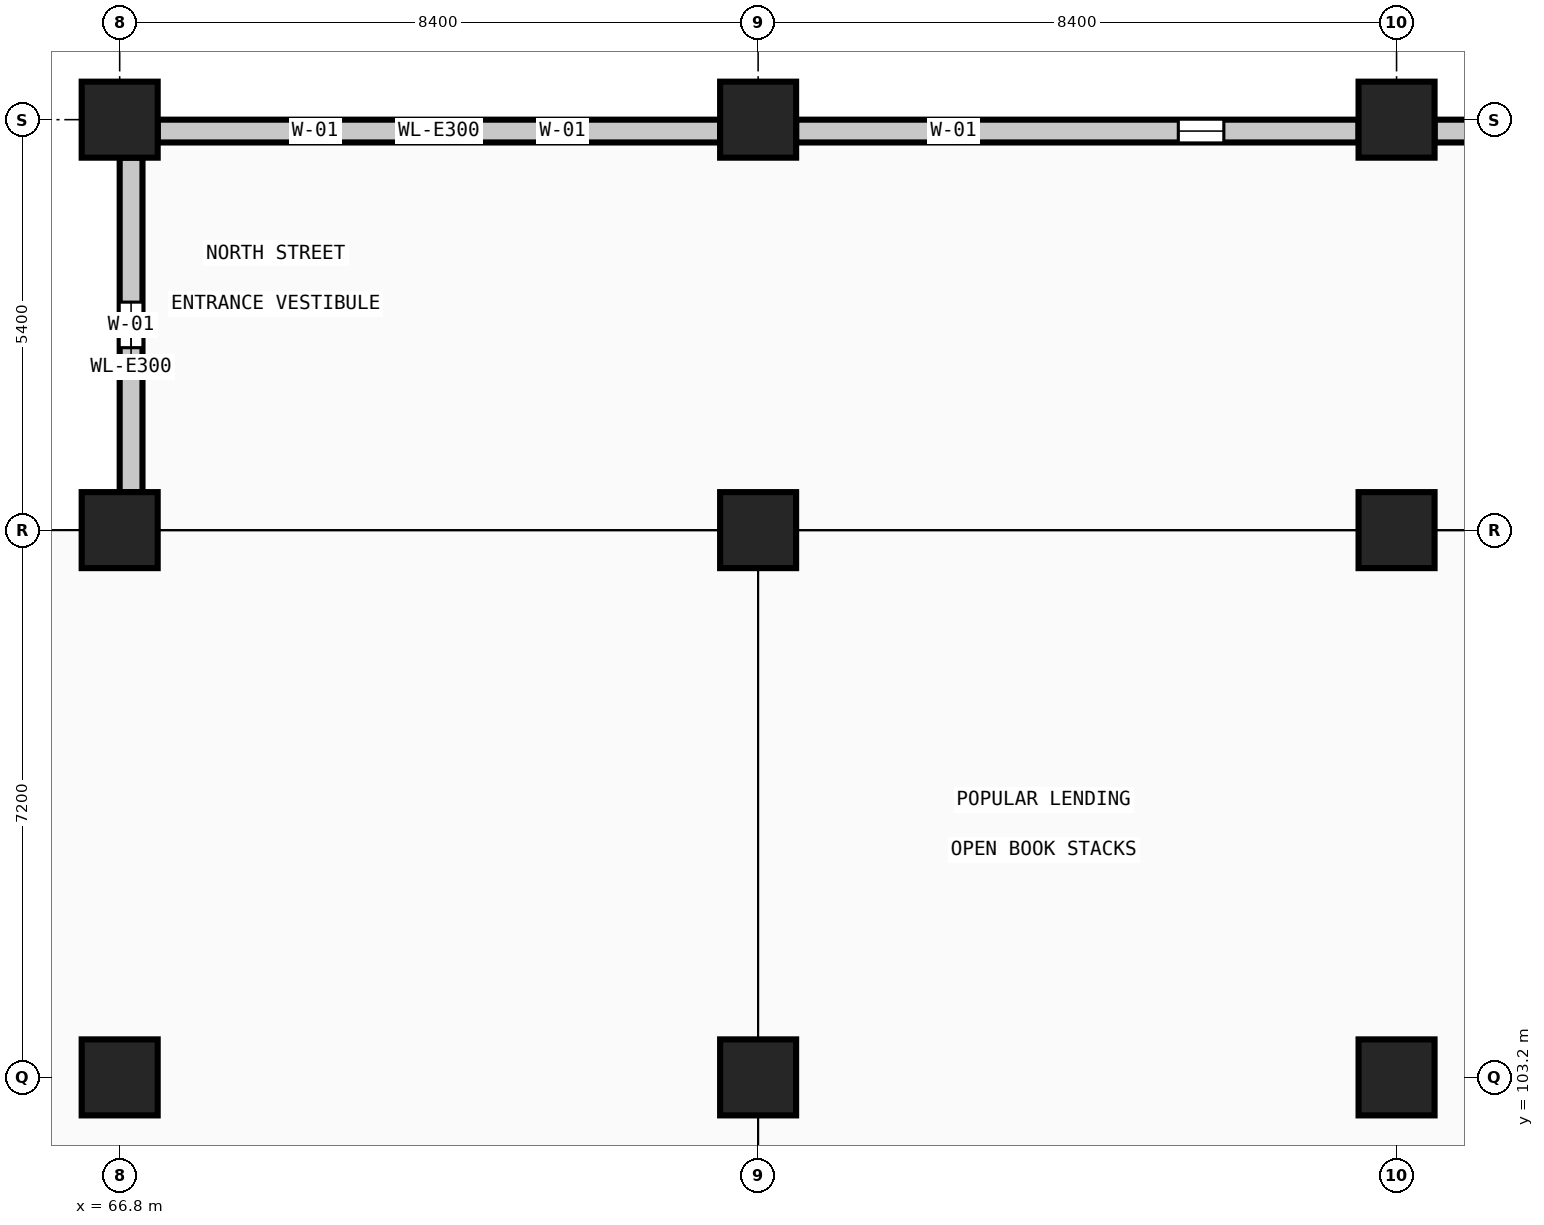
"""IFC4 building model, lengths in metres.
Left out: names, types, materials, properties, quantities, classifications, styles, units other than length and angle.
Written with IfcOpenShell. Run it as: python <this file> out.ifc"""

import sys

from ifc_helpers import new_model, si_unit, direction, frame, frame_2d, origin, origin_2d, place, context, subcontext, project, spatial, rectangle, extrude, element, fill, save


model = new_model("IFC4")
c1 = context("Model", 3, precision=1e-05, world=origin(), true_north=direction((0.0, 1.0)))
c2 = subcontext(c1, "Body", "Model", "MODEL_VIEW")
j1 = project(units=[si_unit("LENGTHUNIT", "METRE"), si_unit("PLANEANGLEUNIT", "RADIAN")], contexts=[c1])
p1 = place(None, origin())
s1 = spatial("IfcSite", under=j1, at=p1, CompositionType="ELEMENT")
p2 = place(p1, origin())
s2 = spatial("IfcBuilding", under=s1, at=p2, CompositionType="ELEMENT")
p3 = place(p2, origin())
s3 = spatial("IfcBuildingStorey", under=s2, at=p3, CompositionType="ELEMENT", Elevation=0.0)
for number, where, z_axis, x_axis in (
    (1, (66.8, 103.2, 0.0), (0.0, 0.0, 1.0), (1.0, 0.0, 0.0)),
    (2, (66.8, 110.4, 0.0), (0.0, 0.0, 1.0), (1.0, 0.0, 0.0)),
    (3, (66.8, 115.8, 0.0), (0.0, 0.0, 1.0), (1.0, 0.0, 0.0)),
    (4, (75.2, 103.2, 0.0), (0.0, 0.0, 1.0), (1.0, 0.0, 0.0)),
    (5, (75.2, 110.4, 0.0), (0.0, 0.0, 1.0), (1.0, 0.0, 0.0)),
    (6, (75.2, 115.8, 0.0), (0.0, 0.0, 1.0), (1.0, 0.0, 0.0)),
    (7, (83.6, 103.2, 0.0), (0.0, 0.0, 1.0), (1.0, 0.0, 0.0)),
    (8, (83.6, 110.4, 0.0), (0.0, 0.0, 1.0), (1.0, 0.0, 0.0)),
    (9, (83.6, 115.8, 0.0), (0.0, 0.0, 1.0), (1.0, 0.0, 0.0)),
):
    element("IfcColumn", number, at=place(p3, frame(where, z_axis=z_axis, x_axis=x_axis)), inside=s3, PredefinedType="COLUMN", context=c2, shape_type="SweptSolid", body=[
        extrude(rectangle(XDim=1.0, YDim=1.0, at=origin_2d()), origin(), (0.0, 0.0, 1.0), 4.8),
    ])
p4 = place(p3, frame((66.95, 110.9, 0.0), z_axis=(0.0, 0.0, 1.0), x_axis=(0.0, 1.0, 0.0)))
e10 = element("IfcWall", 10, at=p4, inside=s3, PredefinedType="SOLIDWALL", context=c2, shape_type="SweptSolid", body=[
    extrude(rectangle(XDim=4.4, YDim=0.3, at=frame_2d((2.2, 0.0))), origin(), (0.0, 0.0, 1.0), 4.2),
])
p5 = place(p4, frame((1.9, 0.0, 0.9)))
e11 = element("IfcOpeningElement", 11, at=p5, cuts=e10, PredefinedType="OPENING", context=c2, shape_type="SweptSolid", body=[
    extrude(rectangle(XDim=0.6, YDim=2.4, at=frame_2d((0.3, 1.2))), frame((0.0, 0.16, 0.0), z_axis=(0.0, -1.0, 0.0), x_axis=(1.0, 0.0, 0.0)), (0.0, 0.0, 1.0), 0.32),
])
p6 = place(p3, frame((67.3, 115.65, 0.0), z_axis=(0.0, 0.0, 1.0), x_axis=(1.0, 0.0, 0.0)))
e12 = element("IfcWall", 12, at=p6, inside=s3, PredefinedType="SOLIDWALL", context=c2, shape_type="SweptSolid", body=[
    extrude(rectangle(XDim=7.4, YDim=0.3, at=frame_2d((3.7, 0.0))), origin(), (0.0, 0.0, 1.0), 3.85),
])
p7 = place(p6, frame((1.772, 0.0, 0.9)))
e13 = element("IfcOpeningElement", 13, at=p7, cuts=e12, PredefinedType="OPENING", context=c2, shape_type="SweptSolid", body=[
    extrude(rectangle(XDim=0.6, YDim=2.4, at=frame_2d((0.3, 1.2))), frame((0.0, 0.16, 0.0), z_axis=(0.0, -1.0, 0.0), x_axis=(1.0, 0.0, 0.0)), (0.0, 0.0, 1.0), 0.32),
])
p8 = place(p6, frame((5.028, 0.0, 0.9)))
e14 = element("IfcOpeningElement", 14, at=p8, cuts=e12, PredefinedType="OPENING", context=c2, shape_type="SweptSolid", body=[
    extrude(rectangle(XDim=0.6, YDim=2.4, at=frame_2d((0.3, 1.2))), frame((0.0, 0.16, 0.0), z_axis=(0.0, -1.0, 0.0), x_axis=(1.0, 0.0, 0.0)), (0.0, 0.0, 1.0), 0.32),
])
p9 = place(p3, frame((75.7, 115.65, 0.0), z_axis=(0.0, 0.0, 1.0), x_axis=(1.0, 0.0, 0.0)))
e15 = element("IfcWall", 15, at=p9, inside=s3, PredefinedType="SOLIDWALL", context=c2, shape_type="SweptSolid", body=[
    extrude(rectangle(XDim=7.4, YDim=0.3, at=frame_2d((3.7, 0.0))), origin(), (0.0, 0.0, 1.0), 3.85),
])
p10 = place(p9, frame((1.772, 0.0, 0.9)))
e16 = element("IfcOpeningElement", 16, at=p10, cuts=e15, PredefinedType="OPENING", context=c2, shape_type="SweptSolid", body=[
    extrude(rectangle(XDim=0.6, YDim=2.4, at=frame_2d((0.3, 1.2))), frame((0.0, 0.16, 0.0), z_axis=(0.0, -1.0, 0.0), x_axis=(1.0, 0.0, 0.0)), (0.0, 0.0, 1.0), 0.32),
])
p11 = place(p9, frame((5.028, 0.0, 0.9)))
e17 = element("IfcOpeningElement", 17, at=p11, cuts=e15, PredefinedType="OPENING", context=c2, shape_type="SweptSolid", body=[
    extrude(rectangle(XDim=0.6, YDim=2.4, at=frame_2d((0.3, 1.2))), frame((0.0, 0.16, 0.0), z_axis=(0.0, -1.0, 0.0), x_axis=(1.0, 0.0, 0.0)), (0.0, 0.0, 1.0), 0.32),
])
p12 = place(p3, frame((84.1, 115.65, 0.0), z_axis=(0.0, 0.0, 1.0), x_axis=(1.0, 0.0, 0.0)))
e18 = element("IfcWall", 18, at=p12, inside=s3, PredefinedType="SOLIDWALL", context=c2, shape_type="SweptSolid", body=[
    extrude(rectangle(XDim=7.4, YDim=0.3, at=frame_2d((3.7, 0.0))), origin(), (0.0, 0.0, 1.0), 3.85),
])
p13 = place(p12, frame((2.7, 0.0, 0.0)))
e19 = element("IfcOpeningElement", 19, at=p13, cuts=e18, PredefinedType="OPENING", context=c2, shape_type="SweptSolid", body=[
    extrude(rectangle(XDim=2.0, YDim=2.4, at=frame_2d((1.0, 1.2))), frame((0.0, 0.16, 0.0), z_axis=(0.0, -1.0, 0.0), x_axis=(1.0, 0.0, 0.0)), (0.0, 0.0, 1.0), 0.32),
])
p14 = place(p5, origin())
e20 = element("IfcWindow", 20, at=p14, inside=s3, PartitioningType="SINGLE_PANEL", PredefinedType="WINDOW", context=c2, shape_type="SweptSolid", body=[
    extrude(rectangle(XDim=0.6, YDim=2.4, at=frame_2d((0.3, 1.2))), frame((0.0, 0.03, 0.0), z_axis=(0.0, -1.0, 0.0), x_axis=(1.0, 0.0, 0.0)), (0.0, 0.0, 1.0), 0.06),
])
fill(e11, e20)
p15 = place(p7, origin())
e21 = element("IfcWindow", 21, at=p15, inside=s3, PartitioningType="SINGLE_PANEL", PredefinedType="WINDOW", context=c2, shape_type="SweptSolid", body=[
    extrude(rectangle(XDim=0.6, YDim=2.4, at=frame_2d((0.3, 1.2))), frame((0.0, 0.03, 0.0), z_axis=(0.0, -1.0, 0.0), x_axis=(1.0, 0.0, 0.0)), (0.0, 0.0, 1.0), 0.06),
])
fill(e13, e21)
p16 = place(p8, origin())
e22 = element("IfcWindow", 22, at=p16, inside=s3, PartitioningType="SINGLE_PANEL", PredefinedType="WINDOW", context=c2, shape_type="SweptSolid", body=[
    extrude(rectangle(XDim=0.6, YDim=2.4, at=frame_2d((0.3, 1.2))), frame((0.0, 0.03, 0.0), z_axis=(0.0, -1.0, 0.0), x_axis=(1.0, 0.0, 0.0)), (0.0, 0.0, 1.0), 0.06),
])
fill(e14, e22)
p17 = place(p10, origin())
e23 = element("IfcWindow", 23, at=p17, inside=s3, PartitioningType="SINGLE_PANEL", PredefinedType="WINDOW", context=c2, shape_type="SweptSolid", body=[
    extrude(rectangle(XDim=0.6, YDim=2.4, at=frame_2d((0.3, 1.2))), frame((0.0, 0.03, 0.0), z_axis=(0.0, -1.0, 0.0), x_axis=(1.0, 0.0, 0.0)), (0.0, 0.0, 1.0), 0.06),
])
fill(e16, e23)
p18 = place(p11, origin())
e24 = element("IfcWindow", 24, at=p18, inside=s3, PartitioningType="SINGLE_PANEL", PredefinedType="WINDOW", context=c2, shape_type="SweptSolid", body=[
    extrude(rectangle(XDim=0.6, YDim=2.4, at=frame_2d((0.3, 1.2))), frame((0.0, 0.03, 0.0), z_axis=(0.0, -1.0, 0.0), x_axis=(1.0, 0.0, 0.0)), (0.0, 0.0, 1.0), 0.06),
])
fill(e17, e24)
save(model, sys.argv[1])
